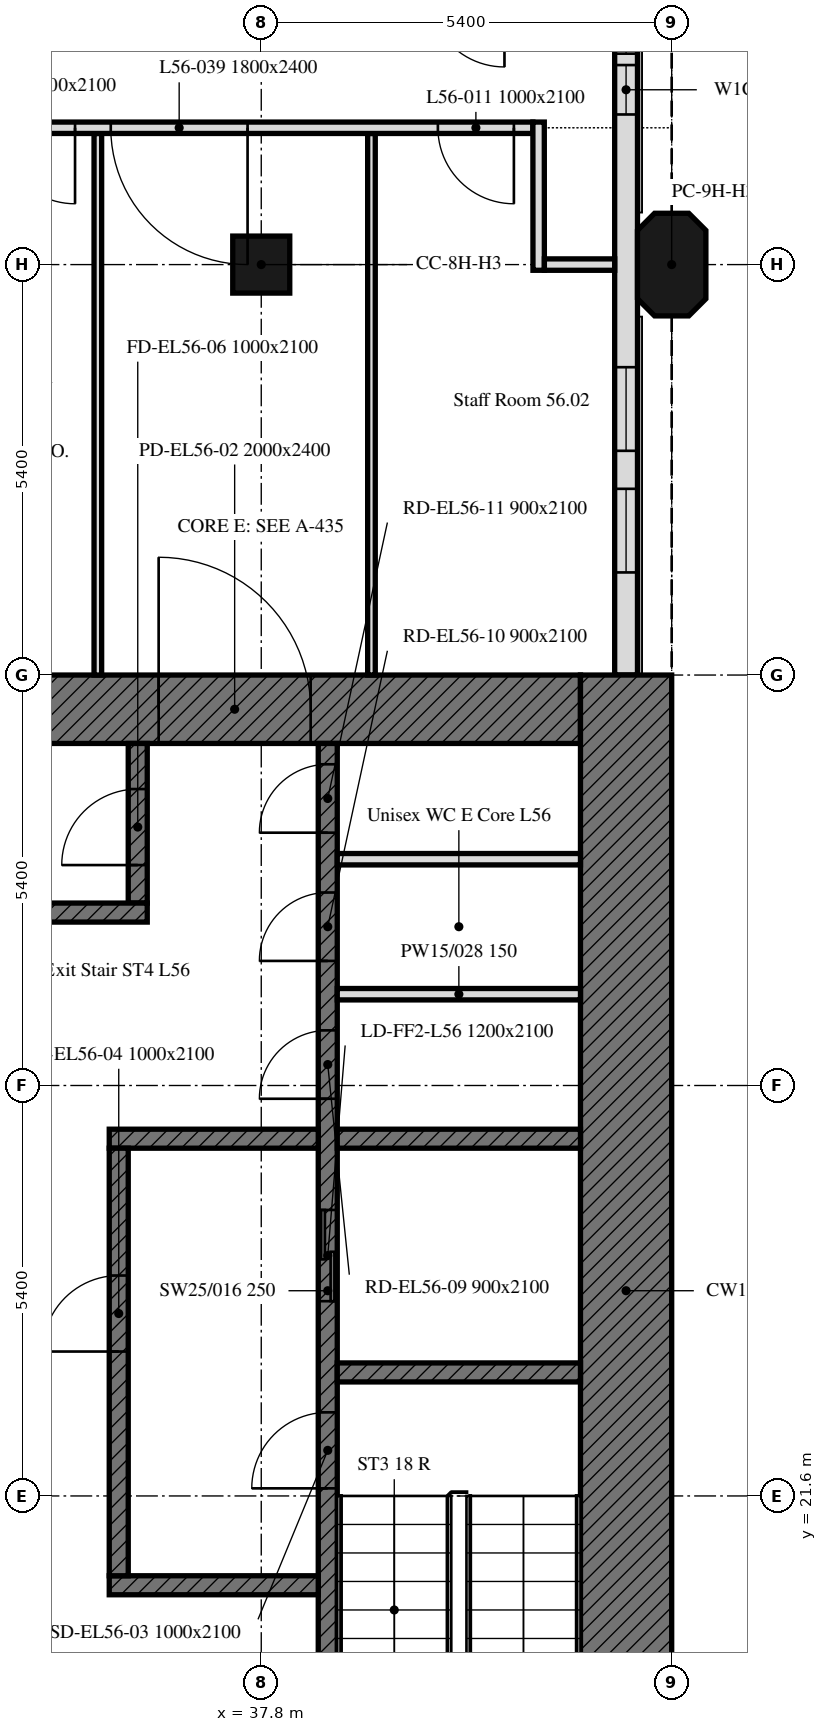
"""IFC4 building model, lengths in metres.
Left out: names, types, materials, properties, quantities, classifications, styles, units other than length and angle.
Written with IfcOpenShell. Run it as: python <this file> out.ifc"""

import sys

from ifc_helpers import new_model, si_unit, direction, frame, frame_2d, origin, origin_2d, place, context, subcontext, project, spatial, polyline, rectangle, outline, extrude, element, fill, save


model = new_model("IFC4")
c1 = context("Model", 3, precision=1e-05, world=origin(), true_north=direction((0.0, 1.0)))
c2 = subcontext(c1, "Body", "Model", "MODEL_VIEW")
j1 = project(units=[si_unit("LENGTHUNIT", "METRE"), si_unit("PLANEANGLEUNIT", "RADIAN")], contexts=[c1])
p1 = place(None, origin())
s1 = spatial("IfcSite", under=j1, at=p1, CompositionType="ELEMENT")
p2 = place(p1, origin())
s2 = spatial("IfcBuilding", under=s1, at=p2, CompositionType="ELEMENT")
p3 = place(p2, frame((0.0, 0.0, 223.6)))
s3 = spatial("IfcBuildingStorey", under=s2, at=p3, CompositionType="ELEMENT", Elevation=223.6)
p4 = place(p3, frame((37.8, 37.8, 0.0), z_axis=(0.0, 0.0, 1.0), x_axis=(1.0, 0.0, 0.0)))
e1 = element("IfcColumn", 1, at=p4, inside=s3, PredefinedType="COLUMN", context=c2, shape_type="SweptSolid", body=[
    extrude(rectangle(XDim=0.75, YDim=0.75, at=origin_2d()), origin(), (0.0, 0.0, 1.0), 3.0),
])
p5 = place(p3, frame((43.2, 37.8, 0.0), z_axis=(0.0, 0.0, 1.0), x_axis=(0.0, 1.0, 0.0)))
e2 = element("IfcColumn", 2, at=p5, inside=s3, PredefinedType="COLUMN", context=c2, shape_type="SweptSolid", body=[
    extrude(outline(polyline([(-0.45, -0.45), (0.45, -0.45), (0.675, -0.225), (0.675, 0.225), (0.45, 0.45), (-0.45, 0.45), (-0.675, 0.225), (-0.675, -0.225), (-0.45, -0.45)])), origin(), (0.0, 0.0, 1.0), 3.0),
])
p6 = place(p3, frame((42.6, 32.4, 0.0), z_axis=(0.0, 0.0, 1.0), x_axis=(0.0, 1.0, 0.0)))
e3 = element("IfcWall", 3, at=p6, inside=s3, PredefinedType="SOLIDWALL", context=c2, shape_type="SweptSolid", body=[
    extrude(rectangle(XDim=10.614, YDim=0.3, at=frame_2d((5.307, 0.0))), origin(), (0.0, 0.0, 1.0), 3.0),
])
p7 = place(p6, frame((1.35, 0.0, 0.9)))
e4 = element("IfcOpeningElement", 4, at=p7, cuts=e3, PredefinedType="OPENING", context=c2, shape_type="SweptSolid", body=[
    extrude(rectangle(XDim=1.1, YDim=1.7, at=frame_2d((0.55, 0.85))), frame((0.0, 0.16, 0.0), z_axis=(0.0, -1.0, 0.0), x_axis=(1.0, 0.0, 0.0)), (0.0, 0.0, 1.0), 0.32),
])
p8 = place(p6, frame((2.95, 0.0, 0.9)))
e5 = element("IfcOpeningElement", 5, at=p8, cuts=e3, PredefinedType="OPENING", context=c2, shape_type="SweptSolid", body=[
    extrude(rectangle(XDim=1.1, YDim=1.7, at=frame_2d((0.55, 0.85))), frame((0.0, 0.16, 0.0), z_axis=(0.0, -1.0, 0.0), x_axis=(1.0, 0.0, 0.0)), (0.0, 0.0, 1.0), 0.32),
])
p9 = place(p6, frame((7.375, 0.0, 0.9)))
e6 = element("IfcOpeningElement", 6, at=p9, cuts=e3, PredefinedType="OPENING", context=c2, shape_type="SweptSolid", body=[
    extrude(rectangle(XDim=0.65, YDim=1.7, at=frame_2d((0.325, 0.85))), frame((0.0, 0.16, 0.0), z_axis=(0.0, -1.0, 0.0), x_axis=(1.0, 0.0, 0.0)), (0.0, 0.0, 1.0), 0.32),
])
p10 = place(p6, frame((8.175, 0.0, 0.9)))
e7 = element("IfcOpeningElement", 7, at=p10, cuts=e3, PredefinedType="OPENING", context=c2, shape_type="SweptSolid", body=[
    extrude(rectangle(XDim=0.65, YDim=1.7, at=frame_2d((0.325, 0.85))), frame((0.0, 0.16, 0.0), z_axis=(0.0, -1.0, 0.0), x_axis=(1.0, 0.0, 0.0)), (0.0, 0.0, 1.0), 0.32),
])
p11 = place(p3, frame((30.9, 31.95, 0.0), z_axis=(0.0, 0.0, 1.0), x_axis=(1.0, 0.0, 0.0)))
e8 = element("IfcWall", 8, at=p11, inside=s3, PredefinedType="SOLIDWALL", context=c2, shape_type="SweptSolid", body=[
    extrude(rectangle(XDim=11.1, YDim=0.9, at=frame_2d((5.55, 0.0))), origin(), (0.0, 0.0, 1.0), 3.0),
])
p12 = place(p11, frame((5.55, 0.0, 0.0)))
e9 = element("IfcOpeningElement", 9, at=p12, cuts=e8, PredefinedType="OPENING", context=c2, shape_type="SweptSolid", body=[
    extrude(rectangle(XDim=2.0, YDim=2.4, at=frame_2d((1.0, 1.2))), frame((0.0, 0.45, 0.0), z_axis=(0.0, -1.0, 0.0), x_axis=(1.0, 0.0, 0.0)), (0.0, 0.0, 1.0), 0.9),
])
p13 = place(p3, frame((42.6, 32.4, 0.0), z_axis=(0.0, 0.0, 1.0), x_axis=(0.0, -1.0, 0.0)))
e10 = element("IfcWall", 10, at=p13, inside=s3, PredefinedType="SOLIDWALL", context=c2, shape_type="SweptSolid", body=[
    extrude(rectangle(XDim=16.2, YDim=1.2, at=frame_2d((8.1, 0.0))), origin(), (0.0, 0.0, 1.0), 3.0),
])
p14 = place(p3, frame((38.675, 17.1, 0.0), z_axis=(0.0, 0.0, 1.0), x_axis=(0.0, 1.0, 0.0)))
e11 = element("IfcWall", 11, at=p14, inside=s3, PredefinedType="SOLIDWALL", context=c2, shape_type="SweptSolid", body=[
    extrude(rectangle(XDim=14.4, YDim=0.25, at=frame_2d((7.2, 0.0))), origin(), (0.0, 0.0, 1.0), 3.0),
])
p15 = place(p14, frame((4.6, 0.0, 0.0)))
e12 = element("IfcOpeningElement", 12, at=p15, cuts=e11, PredefinedType="OPENING", context=c2, shape_type="SweptSolid", body=[
    extrude(rectangle(XDim=1.0, YDim=2.1, at=frame_2d((0.5, 1.05))), frame((0.0, 0.125, 0.0), z_axis=(0.0, -1.0, 0.0), x_axis=(1.0, 0.0, 0.0)), (0.0, 0.0, 1.0), 0.25),
])
p16 = place(p14, frame((7.062, 0.0, 0.0)))
e13 = element("IfcOpeningElement", 13, at=p16, cuts=e11, PredefinedType="OPENING", context=c2, shape_type="SweptSolid", body=[
    extrude(rectangle(XDim=1.2, YDim=2.1, at=frame_2d((0.6, 1.05))), frame((0.0, 0.125, 0.0), z_axis=(0.0, -1.0, 0.0), x_axis=(1.0, 0.0, 0.0)), (0.0, 0.0, 1.0), 0.25),
])
p17 = place(p14, frame((9.726, 0.0, 0.0)))
e14 = element("IfcOpeningElement", 14, at=p17, cuts=e11, PredefinedType="OPENING", context=c2, shape_type="SweptSolid", body=[
    extrude(rectangle(XDim=0.9, YDim=2.1, at=frame_2d((0.45, 1.05))), frame((0.0, 0.125, 0.0), z_axis=(0.0, -1.0, 0.0), x_axis=(1.0, 0.0, 0.0)), (0.0, 0.0, 1.0), 0.25),
])
p18 = place(p14, frame((11.539, 0.0, 0.0)))
e15 = element("IfcOpeningElement", 15, at=p18, cuts=e11, PredefinedType="OPENING", context=c2, shape_type="SweptSolid", body=[
    extrude(rectangle(XDim=0.9, YDim=2.1, at=frame_2d((0.45, 1.05))), frame((0.0, 0.125, 0.0), z_axis=(0.0, -1.0, 0.0), x_axis=(1.0, 0.0, 0.0)), (0.0, 0.0, 1.0), 0.25),
])
p19 = place(p14, frame((13.226, 0.0, 0.0)))
e16 = element("IfcOpeningElement", 16, at=p19, cuts=e11, PredefinedType="OPENING", context=c2, shape_type="SweptSolid", body=[
    extrude(rectangle(XDim=0.9, YDim=2.1, at=frame_2d((0.45, 1.05))), frame((0.0, 0.125, 0.0), z_axis=(0.0, -1.0, 0.0), x_axis=(1.0, 0.0, 0.0)), (0.0, 0.0, 1.0), 0.25),
])
for number, where, z_axis, x_axis in (
    (17, (38.8, 23.225, 0.0), (0.0, 0.0, 1.0), (1.0, 0.0, 0.0)),
    (18, (38.8, 26.3, 0.0), (0.0, 0.0, 1.0), (1.0, 0.0, 0.0)),
):
    element("IfcWall", number, at=place(p3, frame(where, z_axis=z_axis, x_axis=x_axis)), inside=s3, PredefinedType="SOLIDWALL", context=c2, shape_type="SweptSolid", body=[
        extrude(rectangle(XDim=3.2, YDim=0.25, at=frame_2d((1.6, 0.0))), origin(), (0.0, 0.0, 1.0), 3.0),
    ])
for number, where, z_axis, x_axis in (
    (19, (35.8, 26.3, 0.0), (0.0, 0.0, 1.0), (1.0, 0.0, 0.0)),
    (20, (35.8, 20.425, 0.0), (0.0, 0.0, 1.0), (1.0, 0.0, 0.0)),
):
    element("IfcWall", number, at=place(p3, frame(where, z_axis=z_axis, x_axis=x_axis)), inside=s3, PredefinedType="SOLIDWALL", context=c2, shape_type="SweptSolid", body=[
        extrude(rectangle(XDim=2.75, YDim=0.25, at=frame_2d((1.375, 0.0))), origin(), (0.0, 0.0, 1.0), 3.0),
    ])
p20 = place(p3, frame((36.175, 29.4, 0.0), z_axis=(0.0, 0.0, 1.0), x_axis=(0.0, 1.0, 0.0)))
e21 = element("IfcWall", 21, at=p20, inside=s3, PredefinedType="SOLIDWALL", context=c2, shape_type="SweptSolid", body=[
    extrude(rectangle(XDim=2.1, YDim=0.25, at=frame_2d((1.05, 0.0))), origin(), (0.0, 0.0, 1.0), 3.0),
])
p21 = place(p20, frame((0.5, 0.0, 0.0)))
e22 = element("IfcOpeningElement", 22, at=p21, cuts=e21, PredefinedType="OPENING", context=c2, shape_type="SweptSolid", body=[
    extrude(rectangle(XDim=1.0, YDim=2.1, at=frame_2d((0.5, 1.05))), frame((0.0, 0.125, 0.0), z_axis=(0.0, -1.0, 0.0), x_axis=(1.0, 0.0, 0.0)), (0.0, 0.0, 1.0), 0.25),
])
p22 = place(p3, frame((34.35, 29.275, 0.0), z_axis=(0.0, 0.0, 1.0), x_axis=(1.0, 0.0, 0.0)))
e23 = element("IfcWall", 23, at=p22, inside=s3, PredefinedType="SOLIDWALL", context=c2, shape_type="SweptSolid", body=[
    extrude(rectangle(XDim=1.95, YDim=0.25, at=frame_2d((0.975, 0.0))), origin(), (0.0, 0.0, 1.0), 3.0),
])
p23 = place(p3, frame((35.925, 20.55, 0.0), z_axis=(0.0, 0.0, 1.0), x_axis=(0.0, 1.0, 0.0)))
e24 = element("IfcWall", 24, at=p23, inside=s3, PredefinedType="SOLIDWALL", context=c2, shape_type="SweptSolid", body=[
    extrude(rectangle(XDim=5.625, YDim=0.25, at=frame_2d((2.812, 0.0))), origin(), (0.0, 0.0, 1.0), 3.0),
])
p24 = place(p23, frame((2.95, 0.0, 0.0)))
e25 = element("IfcOpeningElement", 25, at=p24, cuts=e24, PredefinedType="OPENING", context=c2, shape_type="SweptSolid", body=[
    extrude(rectangle(XDim=1.0, YDim=2.1, at=frame_2d((0.5, 1.05))), frame((0.0, 0.125, 0.0), z_axis=(0.0, -1.0, 0.0), x_axis=(1.0, 0.0, 0.0)), (0.0, 0.0, 1.0), 0.25),
])
for number, where, z_axis, x_axis in (
    (26, (38.8, 28.201, 0.0), (0.0, 0.0, 1.0), (1.0, 0.0, 0.0)),
    (27, (38.8, 29.977, 0.0), (0.0, 0.0, 1.0), (1.0, 0.0, 0.0)),
):
    element("IfcWall", number, at=place(p3, frame(where, z_axis=z_axis, x_axis=x_axis)), inside=s3, PredefinedType="PARTITIONING", context=c2, shape_type="SweptSolid", body=[
        extrude(rectangle(XDim=3.2, YDim=0.15, at=frame_2d((1.6, 0.0))), origin(), (0.0, 0.0, 1.0), 3.0),
    ])
for number, where, z_axis, x_axis in (
    (28, (39.25, 32.4, 0.0), (0.0, 0.0, 1.0), (0.0, 1.0, 0.0)),
    (29, (35.65, 39.525, 0.0), (0.0, 0.0, 1.0), (0.0, -1.0, 0.0)),
):
    element("IfcWall", number, at=place(p3, frame(where, z_axis=z_axis, x_axis=x_axis)), inside=s3, PredefinedType="PARTITIONING", context=c2, shape_type="SweptSolid", body=[
        extrude(rectangle(XDim=7.125, YDim=0.1, at=frame_2d((3.562, 0.0))), origin(), (0.0, 0.0, 1.0), 3.0),
    ])
p25 = place(p3, frame((41.374, 39.6, 0.0), z_axis=(0.0, 0.0, 1.0), x_axis=(-1.0, 0.0, 0.0)))
e30 = element("IfcWall", 30, at=p25, inside=s3, PredefinedType="PARTITIONING", context=c2, shape_type="SweptSolid", body=[
    extrude(rectangle(XDim=35.899, YDim=0.15, at=frame_2d((17.949, 0.0))), origin(), (0.0, 0.0, 1.0), 2.4),
])
p26 = place(p25, frame((0.25, 0.0, 0.0)))
e31 = element("IfcOpeningElement", 31, at=p26, cuts=e30, PredefinedType="OPENING", context=c2, shape_type="SweptSolid", body=[
    extrude(rectangle(XDim=1.0, YDim=2.1, at=frame_2d((0.5, 1.05))), frame((0.0, 0.075, 0.0), z_axis=(0.0, -1.0, 0.0), x_axis=(1.0, 0.0, 0.0)), (0.0, 0.0, 1.0), 0.15),
])
p27 = place(p25, frame((27.124, 0.0, 0.0)))
e32 = element("IfcOpeningElement", 32, at=p27, cuts=e30, PredefinedType="OPENING", context=c2, shape_type="SweptSolid", body=[
    extrude(rectangle(XDim=1.0, YDim=2.1, at=frame_2d((0.5, 1.05))), frame((0.0, 0.075, 0.0), z_axis=(0.0, -1.0, 0.0), x_axis=(1.0, 0.0, 0.0)), (0.0, 0.0, 1.0), 0.15),
])
p28 = place(p25, frame((6.024, 0.0, 0.0)))
e33 = element("IfcOpeningElement", 33, at=p28, cuts=e30, PredefinedType="OPENING", context=c2, shape_type="SweptSolid", body=[
    extrude(rectangle(XDim=1.0, YDim=2.1, at=frame_2d((0.5, 1.05))), frame((0.0, 0.075, 0.0), z_axis=(0.0, -1.0, 0.0), x_axis=(1.0, 0.0, 0.0)), (0.0, 0.0, 1.0), 0.15),
])
p29 = place(p25, frame((11.974, 0.0, 0.0)))
e34 = element("IfcOpeningElement", 34, at=p29, cuts=e30, PredefinedType="OPENING", context=c2, shape_type="SweptSolid", body=[
    extrude(rectangle(XDim=1.0, YDim=2.1, at=frame_2d((0.5, 1.05))), frame((0.0, 0.075, 0.0), z_axis=(0.0, -1.0, 0.0), x_axis=(1.0, 0.0, 0.0)), (0.0, 0.0, 1.0), 0.15),
])
p30 = place(p25, frame((15.774, 0.0, 0.0)))
e35 = element("IfcOpeningElement", 35, at=p30, cuts=e30, PredefinedType="OPENING", context=c2, shape_type="SweptSolid", body=[
    extrude(rectangle(XDim=1.0, YDim=2.1, at=frame_2d((0.5, 1.05))), frame((0.0, 0.075, 0.0), z_axis=(0.0, -1.0, 0.0), x_axis=(1.0, 0.0, 0.0)), (0.0, 0.0, 1.0), 0.15),
])
p31 = place(p25, frame((22.774, 0.0, 0.0)))
e36 = element("IfcOpeningElement", 36, at=p31, cuts=e30, PredefinedType="OPENING", context=c2, shape_type="SweptSolid", body=[
    extrude(rectangle(XDim=1.0, YDim=2.1, at=frame_2d((0.5, 1.05))), frame((0.0, 0.075, 0.0), z_axis=(0.0, -1.0, 0.0), x_axis=(1.0, 0.0, 0.0)), (0.0, 0.0, 1.0), 0.15),
])
p32 = place(p25, frame((3.754, 0.0, 0.0)))
e37 = element("IfcOpeningElement", 37, at=p32, cuts=e30, PredefinedType="OPENING", context=c2, shape_type="SweptSolid", body=[
    extrude(rectangle(XDim=1.8, YDim=2.4, at=frame_2d((0.9, 1.2))), frame((0.0, 0.075, 0.0), z_axis=(0.0, -1.0, 0.0), x_axis=(1.0, 0.0, 0.0)), (0.0, 0.0, 1.0), 0.15),
])
p33 = place(p25, frame((29.124, 0.0, 0.0)))
e38 = element("IfcOpeningElement", 38, at=p33, cuts=e30, PredefinedType="OPENING", context=c2, shape_type="SweptSolid", body=[
    extrude(rectangle(XDim=1.0, YDim=2.1, at=frame_2d((0.5, 1.05))), frame((0.0, 0.075, 0.0), z_axis=(0.0, -1.0, 0.0), x_axis=(1.0, 0.0, 0.0)), (0.0, 0.0, 1.0), 0.15),
])
p34 = place(p3, frame((41.449, 39.675, 0.0), z_axis=(0.0, 0.0, 1.0), x_axis=(0.00050081376, -0.999999874593, 0.0)))
e39 = element("IfcWall", 39, at=p34, inside=s3, PredefinedType="PARTITIONING", context=c2, shape_type="SweptSolid", body=[
    extrude(rectangle(XDim=1.95, YDim=0.15, at=frame_2d((0.975, 0.0))), origin(), (0.0, 0.0, 1.0), 3.0),
])
p35 = place(p3, frame((41.525, 37.8, 0.0), z_axis=(0.0, 0.0, 1.0), x_axis=(1.0, 0.0, 0.0)))
e40 = element("IfcWall", 40, at=p35, inside=s3, PredefinedType="PARTITIONING", context=c2, shape_type="SweptSolid", body=[
    extrude(rectangle(XDim=0.925, YDim=0.15, at=frame_2d((0.462, 0.0))), origin(), (0.0, 0.0, 1.0), 3.0),
])
p36 = place(p7, origin())
e41 = element("IfcWindow", 41, at=p36, inside=s3, PartitioningType="SINGLE_PANEL", PredefinedType="WINDOW", context=c2, shape_type="SweptSolid", body=[
    extrude(rectangle(XDim=1.1, YDim=1.7, at=frame_2d((0.55, 0.85))), frame((0.0, 0.03, 0.0), z_axis=(0.0, -1.0, 0.0), x_axis=(1.0, 0.0, 0.0)), (0.0, 0.0, 1.0), 0.06),
])
fill(e4, e41)
p37 = place(p8, origin())
e42 = element("IfcWindow", 42, at=p37, inside=s3, PartitioningType="SINGLE_PANEL", PredefinedType="WINDOW", context=c2, shape_type="SweptSolid", body=[
    extrude(rectangle(XDim=1.1, YDim=1.7, at=frame_2d((0.55, 0.85))), frame((0.0, 0.03, 0.0), z_axis=(0.0, -1.0, 0.0), x_axis=(1.0, 0.0, 0.0)), (0.0, 0.0, 1.0), 0.06),
])
fill(e5, e42)
p38 = place(p9, origin())
e43 = element("IfcWindow", 43, at=p38, inside=s3, PartitioningType="SINGLE_PANEL", PredefinedType="WINDOW", context=c2, shape_type="SweptSolid", body=[
    extrude(rectangle(XDim=0.65, YDim=1.7, at=frame_2d((0.325, 0.85))), frame((0.0, 0.03, 0.0), z_axis=(0.0, -1.0, 0.0), x_axis=(1.0, 0.0, 0.0)), (0.0, 0.0, 1.0), 0.06),
])
fill(e6, e43)
p39 = place(p10, origin())
e44 = element("IfcWindow", 44, at=p39, inside=s3, PartitioningType="SINGLE_PANEL", PredefinedType="WINDOW", context=c2, shape_type="SweptSolid", body=[
    extrude(rectangle(XDim=0.65, YDim=1.7, at=frame_2d((0.325, 0.85))), frame((0.0, 0.03, 0.0), z_axis=(0.0, -1.0, 0.0), x_axis=(1.0, 0.0, 0.0)), (0.0, 0.0, 1.0), 0.06),
])
fill(e7, e44)
p40 = place(p12, origin())
e45 = element("IfcDoor", 45, at=p40, inside=s3, OperationType="DOUBLE_DOOR_SINGLE_SWING", PredefinedType="DOOR", context=c2, shape_type="SweptSolid", body=[
    extrude(rectangle(XDim=2.0, YDim=2.4, at=frame_2d((1.0, 1.2))), frame((0.0, 0.025, 0.0), z_axis=(0.0, -1.0, 0.0), x_axis=(1.0, 0.0, 0.0)), (0.0, 0.0, 1.0), 0.05),
])
fill(e9, e45)
p41 = place(p15, origin())
e46 = element("IfcDoor", 46, at=p41, inside=s3, OperationType="SINGLE_SWING_LEFT", PredefinedType="DOOR", context=c2, shape_type="SweptSolid", body=[
    extrude(rectangle(XDim=1.0, YDim=2.1, at=frame_2d((0.5, 1.05))), frame((0.0, 0.025, 0.0), z_axis=(0.0, -1.0, 0.0), x_axis=(1.0, 0.0, 0.0)), (0.0, 0.0, 1.0), 0.05),
])
fill(e12, e46)
p42 = place(p24, origin())
e47 = element("IfcDoor", 47, at=p42, inside=s3, OperationType="SINGLE_SWING_LEFT", PredefinedType="DOOR", context=c2, shape_type="SweptSolid", body=[
    extrude(rectangle(XDim=1.0, YDim=2.1, at=frame_2d((0.5, 1.05))), frame((0.0, 0.025, 0.0), z_axis=(0.0, -1.0, 0.0), x_axis=(1.0, 0.0, 0.0)), (0.0, 0.0, 1.0), 0.05),
])
fill(e25, e47)
p43 = place(p21, origin())
e48 = element("IfcDoor", 48, at=p43, inside=s3, OperationType="SINGLE_SWING_LEFT", PredefinedType="DOOR", context=c2, shape_type="SweptSolid", body=[
    extrude(rectangle(XDim=1.0, YDim=2.1, at=frame_2d((0.5, 1.05))), frame((0.0, 0.025, 0.0), z_axis=(0.0, -1.0, 0.0), x_axis=(1.0, 0.0, 0.0)), (0.0, 0.0, 1.0), 0.05),
])
fill(e22, e48)
p44 = place(p16, origin())
e49 = element("IfcDoor", 49, at=p44, inside=s3, OperationType="DOUBLE_DOOR_SLIDING", PredefinedType="DOOR", context=c2, shape_type="SweptSolid", body=[
    extrude(rectangle(XDim=1.2, YDim=2.1, at=frame_2d((0.6, 1.05))), frame((0.0, 0.025, 0.0), z_axis=(0.0, -1.0, 0.0), x_axis=(1.0, 0.0, 0.0)), (0.0, 0.0, 1.0), 0.05),
])
fill(e13, e49)
p45 = place(p17, origin())
e50 = element("IfcDoor", 50, at=p45, inside=s3, OperationType="SINGLE_SWING_LEFT", PredefinedType="DOOR", context=c2, shape_type="SweptSolid", body=[
    extrude(rectangle(XDim=0.9, YDim=2.1, at=frame_2d((0.45, 1.05))), frame((0.0, 0.025, 0.0), z_axis=(0.0, -1.0, 0.0), x_axis=(1.0, 0.0, 0.0)), (0.0, 0.0, 1.0), 0.05),
])
fill(e14, e50)
p46 = place(p18, origin())
e51 = element("IfcDoor", 51, at=p46, inside=s3, OperationType="SINGLE_SWING_LEFT", PredefinedType="DOOR", context=c2, shape_type="SweptSolid", body=[
    extrude(rectangle(XDim=0.9, YDim=2.1, at=frame_2d((0.45, 1.05))), frame((0.0, 0.025, 0.0), z_axis=(0.0, -1.0, 0.0), x_axis=(1.0, 0.0, 0.0)), (0.0, 0.0, 1.0), 0.05),
])
fill(e15, e51)
p47 = place(p19, origin())
e52 = element("IfcDoor", 52, at=p47, inside=s3, OperationType="SINGLE_SWING_LEFT", PredefinedType="DOOR", context=c2, shape_type="SweptSolid", body=[
    extrude(rectangle(XDim=0.9, YDim=2.1, at=frame_2d((0.45, 1.05))), frame((0.0, 0.025, 0.0), z_axis=(0.0, -1.0, 0.0), x_axis=(1.0, 0.0, 0.0)), (0.0, 0.0, 1.0), 0.05),
])
fill(e16, e52)
p48 = place(p26, origin())
e53 = element("IfcDoor", 53, at=p48, inside=s3, OperationType="SINGLE_SWING_RIGHT", PredefinedType="DOOR", context=c2, shape_type="SweptSolid", body=[
    extrude(rectangle(XDim=1.0, YDim=2.1, at=frame_2d((0.5, 1.05))), frame((0.0, 0.025, 0.0), z_axis=(0.0, -1.0, 0.0), x_axis=(1.0, 0.0, 0.0)), (0.0, 0.0, 1.0), 0.05),
])
fill(e31, e53)
p49 = place(p28, origin())
e54 = element("IfcDoor", 54, at=p49, inside=s3, OperationType="SINGLE_SWING_LEFT", PredefinedType="DOOR", context=c2, shape_type="SweptSolid", body=[
    extrude(rectangle(XDim=1.0, YDim=2.1, at=frame_2d((0.5, 1.05))), frame((0.0, 0.025, 0.0), z_axis=(0.0, -1.0, 0.0), x_axis=(1.0, 0.0, 0.0)), (0.0, 0.0, 1.0), 0.05),
])
fill(e33, e54)
p50 = place(p32, origin())
e55 = element("IfcDoor", 55, at=p50, inside=s3, OperationType="DOUBLE_DOOR_SINGLE_SWING", PredefinedType="DOOR", context=c2, shape_type="SweptSolid", body=[
    extrude(rectangle(XDim=1.8, YDim=2.4, at=frame_2d((0.9, 1.2))), frame((0.0, 0.025, 0.0), z_axis=(0.0, -1.0, 0.0), x_axis=(1.0, 0.0, 0.0)), (0.0, 0.0, 1.0), 0.05),
])
fill(e37, e55)
save(model, sys.argv[1])
